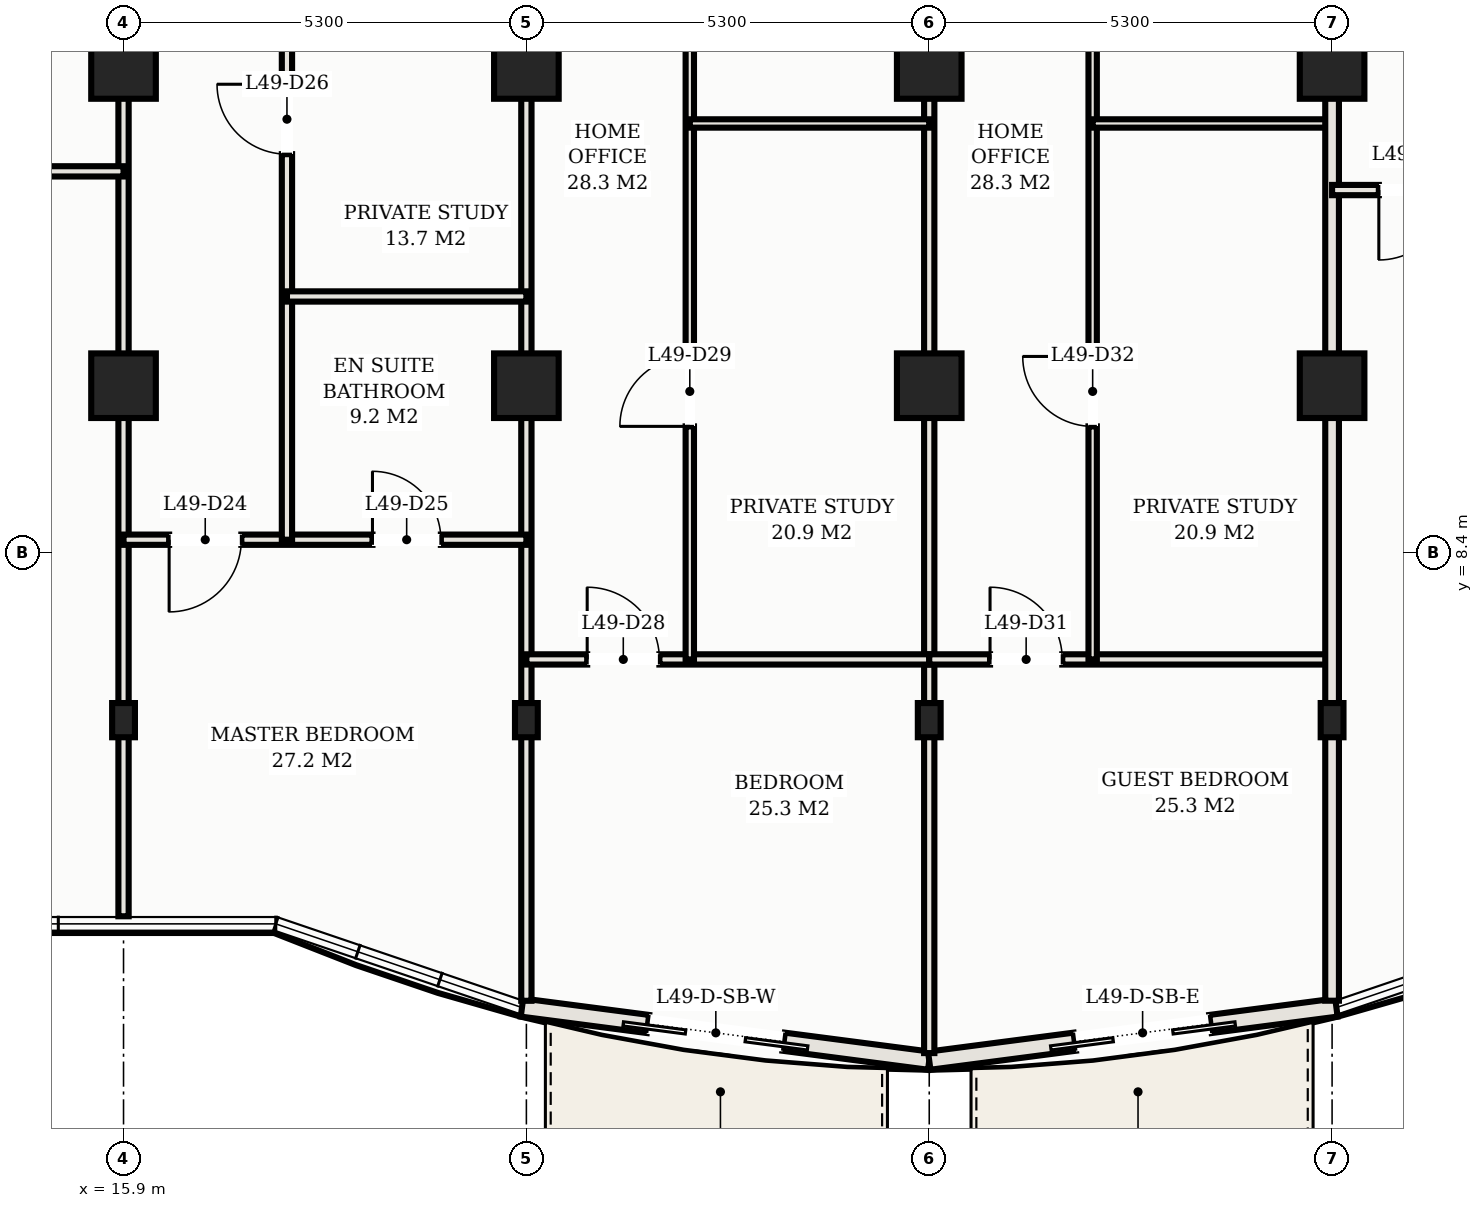
"""IFC4 building model, lengths in metres.
Left out: names, types, materials, properties, quantities, classifications, styles, units other than length and angle.
Written with IfcOpenShell. Run it as: python <this file> out.ifc"""

import sys

from ifc_helpers import new_model, si_unit, direction, frame, frame_2d, origin, origin_2d, place, context, subcontext, project, spatial, rectangle, hollow_rectangle, extrude, element, fill, save


model = new_model("IFC4")
c1 = context("Model", 3, precision=1e-05, world=origin(), true_north=direction((0.0, 1.0)))
c2 = subcontext(c1, "Body", "Model", "MODEL_VIEW")
j1 = project(units=[si_unit("LENGTHUNIT", "METRE"), si_unit("PLANEANGLEUNIT", "RADIAN")], contexts=[c1])
p1 = place(None, origin())
s1 = spatial("IfcSite", under=j1, at=p1, CompositionType="ELEMENT")
p2 = place(p1, origin())
s2 = spatial("IfcBuilding", under=s1, at=p2, CompositionType="ELEMENT")
p3 = place(p2, frame((0.0, 0.0, 178.8)))
s3 = spatial("IfcBuildingStorey", under=s2, at=p3, CompositionType="ELEMENT", Elevation=178.8)
for number, where, z_axis, x_axis in (
    (1, (15.9, 14.8, 0.0), (0.0, 0.0, 1.0), (1.0, 0.0, 0.0)),
    (2, (15.9, 10.6, 0.0), (0.0, 0.0, 1.0), (1.0, 0.0, 0.0)),
    (3, (21.2, 14.8, 0.0), (0.0, 0.0, 1.0), (1.0, 0.0, 0.0)),
    (4, (21.2, 10.6, 0.0), (0.0, 0.0, 1.0), (1.0, 0.0, 0.0)),
    (5, (26.5, 14.8, 0.0), (0.0, 0.0, 1.0), (1.0, 0.0, 0.0)),
    (6, (26.5, 10.6, 0.0), (0.0, 0.0, 1.0), (1.0, 0.0, 0.0)),
    (7, (31.8, 14.8, 0.0), (0.0, 0.0, 1.0), (1.0, 0.0, 0.0)),
    (8, (31.8, 10.6, 0.0), (0.0, 0.0, 1.0), (1.0, 0.0, 0.0)),
):
    element("IfcColumn", number, at=place(p3, frame(where, z_axis=z_axis, x_axis=x_axis)), inside=s3, PredefinedType="COLUMN", context=c2, shape_type="SweptSolid", body=[
        extrude(hollow_rectangle(XDim=0.85, YDim=0.85, WallThickness=0.028, at=origin_2d()), origin(), (0.0, 0.0, 1.0), 3.3),
    ])
for number, where, z_axis, x_axis in (
    (9, (15.9, 6.2, 0.0), (0.0, 0.0, 1.0), (1.0, 0.0, 0.0)),
    (10, (21.2, 6.2, 0.0), (0.0, 0.0, 1.0), (1.0, 0.0, 0.0)),
    (11, (26.5, 6.2, 0.0), (0.0, 0.0, 1.0), (1.0, 0.0, 0.0)),
    (12, (31.8, 6.2, 0.0), (0.0, 0.0, 1.0), (1.0, 0.0, 0.0)),
):
    element("IfcColumn", number, at=place(p3, frame(where, z_axis=z_axis, x_axis=x_axis)), inside=s3, PredefinedType="COLUMN", context=c2, shape_type="SweptSolid", body=[
        extrude(hollow_rectangle(XDim=0.3, YDim=0.45, WallThickness=0.016, at=origin_2d()), origin(), (0.0, 0.0, 1.0), 3.3),
    ])
p4 = place(p3, frame((21.142, 2.419, 0.0), z_axis=(0.0, 0.0, 1.0), x_axis=(0.991597639478, -0.129360432053, 0.0)))
e13 = element("IfcWall", 13, at=p4, inside=s3, PredefinedType="SOLIDWALL", context=c2, shape_type="SweptSolid", body=[
    extrude(rectangle(XDim=5.403, YDim=0.24, at=frame_2d((2.702, 0.0))), origin(), (0.0, 0.0, 1.0), 3.1),
])
p5 = place(p4, frame((1.672, 0.0, 0.0)))
e14 = element("IfcOpeningElement", 14, at=p5, cuts=e13, PredefinedType="OPENING", context=c2, shape_type="SweptSolid", body=[
    extrude(rectangle(XDim=1.8, YDim=2.2, at=frame_2d((0.9, 1.1))), frame((0.0, 0.13, 0.0), z_axis=(0.0, -1.0, 0.0), x_axis=(1.0, 0.0, 0.0)), (0.0, 0.0, 1.0), 0.26),
])
p6 = place(p3, frame((26.5, 1.72, 0.0), z_axis=(0.0, 0.0, 1.0), x_axis=(0.991594614239, 0.129383619568, 0.0)))
e15 = element("IfcWall", 15, at=p6, inside=s3, PredefinedType="SOLIDWALL", context=c2, shape_type="SweptSolid", body=[
    extrude(rectangle(XDim=5.402, YDim=0.24, at=frame_2d((2.701, 0.0))), origin(), (0.0, 0.0, 1.0), 3.1),
])
p7 = place(p6, frame((1.931, 0.0, 0.0)))
e16 = element("IfcOpeningElement", 16, at=p7, cuts=e15, PredefinedType="OPENING", context=c2, shape_type="SweptSolid", body=[
    extrude(rectangle(XDim=1.8, YDim=2.2, at=frame_2d((0.9, 1.1))), frame((0.0, 0.13, 0.0), z_axis=(0.0, -1.0, 0.0), x_axis=(1.0, 0.0, 0.0)), (0.0, 0.0, 1.0), 0.26),
])
p8 = place(p3, frame((15.9, 3.62, 0.0), z_axis=(0.0, 0.0, 1.0), x_axis=(0.0, 1.0, 0.0)))
e17 = element("IfcWall", 17, at=p8, inside=s3, PredefinedType="PARTITIONING", context=c2, shape_type="SweptSolid", body=[
    extrude(rectangle(XDim=17.48, YDim=0.135, at=frame_2d((8.74, 0.0))), origin(), (0.0, 0.0, 1.0), 2.38),
])
p9 = place(p8, frame((15.695, 0.0, 0.0)))
e18 = element("IfcOpeningElement", 18, at=p9, cuts=e17, PredefinedType="OPENING", context=c2, shape_type="SweptSolid", body=[
    extrude(rectangle(XDim=0.92, YDim=2.15, at=frame_2d((0.46, 1.075))), frame((0.0, 0.078, 0.0), z_axis=(0.0, -1.0, 0.0), x_axis=(1.0, 0.0, 0.0)), (0.0, 0.0, 1.0), 0.155),
])
p10 = place(p3, frame((21.2, 2.508, 0.0), z_axis=(0.0, 0.0, 1.0), x_axis=(0.0, 1.0, 0.0)))
e19 = element("IfcWall", 19, at=p10, inside=s3, PredefinedType="PARTITIONING", context=c2, shape_type="SweptSolid", body=[
    extrude(rectangle(XDim=18.592, YDim=0.135, at=frame_2d((9.296, 0.0))), origin(), (0.0, 0.0, 1.0), 2.38),
])
p11 = place(p10, frame((16.807, 0.0, 0.0)))
e20 = element("IfcOpeningElement", 20, at=p11, cuts=e19, PredefinedType="OPENING", context=c2, shape_type="SweptSolid", body=[
    extrude(rectangle(XDim=0.92, YDim=2.15, at=frame_2d((0.46, 1.075))), frame((0.0, 0.078, 0.0), z_axis=(0.0, -1.0, 0.0), x_axis=(1.0, 0.0, 0.0)), (0.0, 0.0, 1.0), 0.155),
])
p12 = place(p3, frame((26.5, 1.82, 0.0), z_axis=(0.0, 0.0, 1.0), x_axis=(0.0, 1.0, 0.0)))
e21 = element("IfcWall", 21, at=p12, inside=s3, PredefinedType="PARTITIONING", context=c2, shape_type="SweptSolid", body=[
    extrude(rectangle(XDim=19.28, YDim=0.135, at=frame_2d((9.64, 0.0))), origin(), (0.0, 0.0, 1.0), 2.38),
])
p13 = place(p12, frame((17.495, 0.0, 0.0)))
e22 = element("IfcOpeningElement", 22, at=p13, cuts=e21, PredefinedType="OPENING", context=c2, shape_type="SweptSolid", body=[
    extrude(rectangle(XDim=0.92, YDim=2.15, at=frame_2d((0.46, 1.075))), frame((0.0, 0.078, 0.0), z_axis=(0.0, -1.0, 0.0), x_axis=(1.0, 0.0, 0.0)), (0.0, 0.0, 1.0), 0.155),
])
p14 = place(p3, frame((10.6, 13.42, 0.0), z_axis=(0.0, 0.0, 1.0), x_axis=(1.0, 0.0, 0.0)))
e23 = element("IfcWall", 23, at=p14, inside=s3, PredefinedType="PARTITIONING", context=c2, shape_type="SweptSolid", body=[
    extrude(rectangle(XDim=5.3, YDim=0.135, at=frame_2d((2.65, 0.0))), origin(), (0.0, 0.0, 1.0), 2.38),
])
p15 = place(p14, frame((0.815, 0.0, 0.0)))
e24 = element("IfcOpeningElement", 24, at=p15, cuts=e23, PredefinedType="OPENING", context=c2, shape_type="SweptSolid", body=[
    extrude(rectangle(XDim=0.92, YDim=2.15, at=frame_2d((0.46, 1.075))), frame((0.0, 0.078, 0.0), z_axis=(0.0, -1.0, 0.0), x_axis=(1.0, 0.0, 0.0)), (0.0, 0.0, 1.0), 0.155),
])
p16 = place(p3, frame((15.9, 8.574, 0.0), z_axis=(0.0, 0.0, 1.0), x_axis=(1.0, 0.0, 0.0)))
e25 = element("IfcWall", 25, at=p16, inside=s3, PredefinedType="PARTITIONING", context=c2, shape_type="SweptSolid", body=[
    extrude(rectangle(XDim=5.3, YDim=0.135, at=frame_2d((2.65, 0.0))), origin(), (0.0, 0.0, 1.0), 2.38),
])
p17 = place(p16, frame((0.6, 0.0, 0.0)))
e26 = element("IfcOpeningElement", 26, at=p17, cuts=e25, PredefinedType="OPENING", context=c2, shape_type="SweptSolid", body=[
    extrude(rectangle(XDim=0.95, YDim=2.15, at=frame_2d((0.475, 1.075))), frame((0.0, 0.078, 0.0), z_axis=(0.0, -1.0, 0.0), x_axis=(1.0, 0.0, 0.0)), (0.0, 0.0, 1.0), 0.155),
])
p18 = place(p16, frame((3.275, 0.0, 0.0)))
e27 = element("IfcOpeningElement", 27, at=p18, cuts=e25, PredefinedType="OPENING", context=c2, shape_type="SweptSolid", body=[
    extrude(rectangle(XDim=0.9, YDim=2.15, at=frame_2d((0.45, 1.075))), frame((0.0, 0.078, 0.0), z_axis=(0.0, -1.0, 0.0), x_axis=(1.0, 0.0, 0.0)), (0.0, 0.0, 1.0), 0.155),
])
p19 = place(p3, frame((18.05, 8.574, 0.0), z_axis=(0.0, 0.0, 1.0), x_axis=(0.0, 1.0, 0.0)))
e28 = element("IfcWall", 28, at=p19, inside=s3, PredefinedType="PARTITIONING", context=c2, shape_type="SweptSolid", body=[
    extrude(rectangle(XDim=12.526, YDim=0.135, at=frame_2d((6.263, 0.0))), origin(), (0.0, 0.0, 1.0), 2.38),
])
p20 = place(p19, frame((5.072, 0.0, 0.0)))
e29 = element("IfcOpeningElement", 29, at=p20, cuts=e28, PredefinedType="OPENING", context=c2, shape_type="SweptSolid", body=[
    extrude(rectangle(XDim=0.92, YDim=2.15, at=frame_2d((0.46, 1.075))), frame((0.0, 0.078, 0.0), z_axis=(0.0, -1.0, 0.0), x_axis=(1.0, 0.0, 0.0)), (0.0, 0.0, 1.0), 0.155),
])
p21 = place(p3, frame((18.05, 11.774, 0.0), z_axis=(0.0, 0.0, 1.0), x_axis=(1.0, 0.0, 0.0)))
e30 = element("IfcWall", 30, at=p21, inside=s3, PredefinedType="PARTITIONING", context=c2, shape_type="SweptSolid", body=[
    extrude(rectangle(XDim=3.15, YDim=0.135, at=frame_2d((1.575, 0.0))), origin(), (0.0, 0.0, 1.0), 2.38),
])
p22 = place(p3, frame((21.2, 6.999, 0.0), z_axis=(0.0, 0.0, 1.0), x_axis=(1.0, 0.0, 0.0)))
e31 = element("IfcWall", 31, at=p22, inside=s3, PredefinedType="PARTITIONING", context=c2, shape_type="SweptSolid", body=[
    extrude(rectangle(XDim=5.3, YDim=0.135, at=frame_2d((2.65, 0.0))), origin(), (0.0, 0.0, 1.0), 2.38),
])
p23 = place(p22, frame((0.8, 0.0, 0.0)))
e32 = element("IfcOpeningElement", 32, at=p23, cuts=e31, PredefinedType="OPENING", context=c2, shape_type="SweptSolid", body=[
    extrude(rectangle(XDim=0.95, YDim=2.15, at=frame_2d((0.475, 1.075))), frame((0.0, 0.078, 0.0), z_axis=(0.0, -1.0, 0.0), x_axis=(1.0, 0.0, 0.0)), (0.0, 0.0, 1.0), 0.155),
])
p24 = place(p3, frame((23.35, 6.999, 0.0), z_axis=(0.0, 0.0, 1.0), x_axis=(0.0, 1.0, 0.0)))
e33 = element("IfcWall", 33, at=p24, inside=s3, PredefinedType="MOVABLE", context=c2, shape_type="SweptSolid", body=[
    extrude(rectangle(XDim=14.101, YDim=0.11, at=frame_2d((7.051, 0.0))), origin(), (0.0, 0.0, 1.0), 2.38),
])
p25 = place(p24, frame((3.066, 0.0, 0.0)))
e34 = element("IfcOpeningElement", 34, at=p25, cuts=e33, PredefinedType="OPENING", context=c2, shape_type="SweptSolid", body=[
    extrude(rectangle(XDim=0.92, YDim=2.15, at=frame_2d((0.46, 1.075))), frame((0.0, 0.065, 0.0), z_axis=(0.0, -1.0, 0.0), x_axis=(1.0, 0.0, 0.0)), (0.0, 0.0, 1.0), 0.13),
])
p26 = place(p24, frame((10.116, 0.0, 0.0)))
e35 = element("IfcOpeningElement", 35, at=p26, cuts=e33, PredefinedType="OPENING", context=c2, shape_type="SweptSolid", body=[
    extrude(rectangle(XDim=0.92, YDim=2.15, at=frame_2d((0.46, 1.075))), frame((0.0, 0.065, 0.0), z_axis=(0.0, -1.0, 0.0), x_axis=(1.0, 0.0, 0.0)), (0.0, 0.0, 1.0), 0.13),
])
p27 = place(p3, frame((23.35, 14.05, 0.0), z_axis=(0.0, 0.0, 1.0), x_axis=(1.0, 0.0, 0.0)))
e36 = element("IfcWall", 36, at=p27, inside=s3, PredefinedType="MOVABLE", context=c2, shape_type="SweptSolid", body=[
    extrude(rectangle(XDim=3.15, YDim=0.11, at=frame_2d((1.575, 0.0))), origin(), (0.0, 0.0, 1.0), 2.38),
])
p28 = place(p3, frame((26.5, 6.999, 0.0), z_axis=(0.0, 0.0, 1.0), x_axis=(1.0, 0.0, 0.0)))
e37 = element("IfcWall", 37, at=p28, inside=s3, PredefinedType="PARTITIONING", context=c2, shape_type="SweptSolid", body=[
    extrude(rectangle(XDim=5.3, YDim=0.135, at=frame_2d((2.65, 0.0))), origin(), (0.0, 0.0, 1.0), 2.38),
])
p29 = place(p28, frame((0.8, 0.0, 0.0)))
e38 = element("IfcOpeningElement", 38, at=p29, cuts=e37, PredefinedType="OPENING", context=c2, shape_type="SweptSolid", body=[
    extrude(rectangle(XDim=0.95, YDim=2.15, at=frame_2d((0.475, 1.075))), frame((0.0, 0.078, 0.0), z_axis=(0.0, -1.0, 0.0), x_axis=(1.0, 0.0, 0.0)), (0.0, 0.0, 1.0), 0.155),
])
p30 = place(p3, frame((28.65, 6.999, 0.0), z_axis=(0.0, 0.0, 1.0), x_axis=(0.0, 1.0, 0.0)))
e39 = element("IfcWall", 39, at=p30, inside=s3, PredefinedType="MOVABLE", context=c2, shape_type="SweptSolid", body=[
    extrude(rectangle(XDim=14.101, YDim=0.11, at=frame_2d((7.051, 0.0))), origin(), (0.0, 0.0, 1.0), 2.38),
])
p31 = place(p30, frame((3.066, 0.0, 0.0)))
e40 = element("IfcOpeningElement", 40, at=p31, cuts=e39, PredefinedType="OPENING", context=c2, shape_type="SweptSolid", body=[
    extrude(rectangle(XDim=0.92, YDim=2.15, at=frame_2d((0.46, 1.075))), frame((0.0, 0.065, 0.0), z_axis=(0.0, -1.0, 0.0), x_axis=(1.0, 0.0, 0.0)), (0.0, 0.0, 1.0), 0.13),
])
p32 = place(p30, frame((10.116, 0.0, 0.0)))
e41 = element("IfcOpeningElement", 41, at=p32, cuts=e39, PredefinedType="OPENING", context=c2, shape_type="SweptSolid", body=[
    extrude(rectangle(XDim=0.92, YDim=2.15, at=frame_2d((0.46, 1.075))), frame((0.0, 0.065, 0.0), z_axis=(0.0, -1.0, 0.0), x_axis=(1.0, 0.0, 0.0)), (0.0, 0.0, 1.0), 0.13),
])
p33 = place(p3, frame((28.65, 14.05, 0.0), z_axis=(0.0, 0.0, 1.0), x_axis=(1.0, 0.0, 0.0)))
e42 = element("IfcWall", 42, at=p33, inside=s3, PredefinedType="MOVABLE", context=c2, shape_type="SweptSolid", body=[
    extrude(rectangle(XDim=3.15, YDim=0.11, at=frame_2d((1.575, 0.0))), origin(), (0.0, 0.0, 1.0), 2.38),
])
p34 = place(p3, frame((31.8, 2.509, 0.0), z_axis=(0.0, 0.0, 1.0), x_axis=(0.0, 1.0, 0.0)))
e43 = element("IfcWall", 43, at=p34, inside=s3, PredefinedType="PARTITIONING", context=c2, shape_type="SweptSolid", body=[
    extrude(rectangle(XDim=18.591, YDim=0.18, at=frame_2d((9.295, 0.0))), origin(), (0.0, 0.0, 1.0), 2.38),
])
p35 = place(p3, frame((31.8, 13.174, 0.0), z_axis=(0.0, 0.0, 1.0), x_axis=(1.0, 0.0, 0.0)))
e44 = element("IfcWall", 44, at=p35, inside=s3, PredefinedType="PARTITIONING", context=c2, shape_type="SweptSolid", body=[
    extrude(rectangle(XDim=5.3, YDim=0.135, at=frame_2d((2.65, 0.0))), origin(), (0.0, 0.0, 1.0), 2.38),
])
p36 = place(p35, frame((0.615, 0.0, 0.0)))
e45 = element("IfcOpeningElement", 45, at=p36, cuts=e44, PredefinedType="OPENING", context=c2, shape_type="SweptSolid", body=[
    extrude(rectangle(XDim=0.92, YDim=2.15, at=frame_2d((0.46, 1.075))), frame((0.0, 0.078, 0.0), z_axis=(0.0, -1.0, 0.0), x_axis=(1.0, 0.0, 0.0)), (0.0, 0.0, 1.0), 0.155),
])
p37 = place(p5, frame((1.8, 0.0, 0.0), z_axis=(0.0, 0.0, 1.0), x_axis=(-1.0, 0.0, 0.0)))
e46 = element("IfcDoor", 46, at=p37, inside=s3, OperationType="DOUBLE_DOOR_SLIDING", PredefinedType="DOOR", context=c2, shape_type="SweptSolid", body=[
    extrude(rectangle(XDim=1.8, YDim=2.2, at=frame_2d((0.9, 1.1))), frame((0.0, 0.025, 0.0), z_axis=(0.0, -1.0, 0.0), x_axis=(1.0, 0.0, 0.0)), (0.0, 0.0, 1.0), 0.05),
])
fill(e14, e46)
p38 = place(p7, frame((1.8, 0.0, 0.0), z_axis=(0.0, 0.0, 1.0), x_axis=(-1.0, 0.0, 0.0)))
e47 = element("IfcDoor", 47, at=p38, inside=s3, OperationType="DOUBLE_DOOR_SLIDING", PredefinedType="DOOR", context=c2, shape_type="SweptSolid", body=[
    extrude(rectangle(XDim=1.8, YDim=2.2, at=frame_2d((0.9, 1.1))), frame((0.0, 0.025, 0.0), z_axis=(0.0, -1.0, 0.0), x_axis=(1.0, 0.0, 0.0)), (0.0, 0.0, 1.0), 0.05),
])
fill(e16, e47)
p39 = place(p17, frame((0.95, 0.0, 0.0), z_axis=(0.0, 0.0, 1.0), x_axis=(-1.0, 0.0, 0.0)))
e48 = element("IfcDoor", 48, at=p39, inside=s3, OperationType="SINGLE_SWING_RIGHT", PredefinedType="DOOR", context=c2, shape_type="SweptSolid", body=[
    extrude(rectangle(XDim=0.95, YDim=2.15, at=frame_2d((0.475, 1.075))), frame((0.0, 0.025, 0.0), z_axis=(0.0, -1.0, 0.0), x_axis=(1.0, 0.0, 0.0)), (0.0, 0.0, 1.0), 0.05),
])
fill(e26, e48)
p40 = place(p18, origin())
e49 = element("IfcDoor", 49, at=p40, inside=s3, OperationType="SINGLE_SWING_LEFT", PredefinedType="DOOR", context=c2, shape_type="SweptSolid", body=[
    extrude(rectangle(XDim=0.9, YDim=2.15, at=frame_2d((0.45, 1.075))), frame((0.0, 0.025, 0.0), z_axis=(0.0, -1.0, 0.0), x_axis=(1.0, 0.0, 0.0)), (0.0, 0.0, 1.0), 0.05),
])
fill(e27, e49)
p41 = place(p20, origin())
e50 = element("IfcDoor", 50, at=p41, inside=s3, OperationType="SINGLE_SWING_RIGHT", PredefinedType="DOOR", context=c2, shape_type="SweptSolid", body=[
    extrude(rectangle(XDim=0.92, YDim=2.15, at=frame_2d((0.46, 1.075))), frame((0.0, 0.025, 0.0), z_axis=(0.0, -1.0, 0.0), x_axis=(1.0, 0.0, 0.0)), (0.0, 0.0, 1.0), 0.05),
])
fill(e29, e50)
p42 = place(p23, origin())
e51 = element("IfcDoor", 51, at=p42, inside=s3, OperationType="SINGLE_SWING_LEFT", PredefinedType="DOOR", context=c2, shape_type="SweptSolid", body=[
    extrude(rectangle(XDim=0.95, YDim=2.15, at=frame_2d((0.475, 1.075))), frame((0.0, 0.025, 0.0), z_axis=(0.0, -1.0, 0.0), x_axis=(1.0, 0.0, 0.0)), (0.0, 0.0, 1.0), 0.05),
])
fill(e32, e51)
p43 = place(p25, origin())
e52 = element("IfcDoor", 52, at=p43, inside=s3, OperationType="SINGLE_SWING_LEFT", PredefinedType="DOOR", context=c2, shape_type="SweptSolid", body=[
    extrude(rectangle(XDim=0.92, YDim=2.15, at=frame_2d((0.46, 1.075))), frame((0.0, 0.025, 0.0), z_axis=(0.0, -1.0, 0.0), x_axis=(1.0, 0.0, 0.0)), (0.0, 0.0, 1.0), 0.05),
])
fill(e34, e52)
p44 = place(p29, origin())
e53 = element("IfcDoor", 53, at=p44, inside=s3, OperationType="SINGLE_SWING_LEFT", PredefinedType="DOOR", context=c2, shape_type="SweptSolid", body=[
    extrude(rectangle(XDim=0.95, YDim=2.15, at=frame_2d((0.475, 1.075))), frame((0.0, 0.025, 0.0), z_axis=(0.0, -1.0, 0.0), x_axis=(1.0, 0.0, 0.0)), (0.0, 0.0, 1.0), 0.05),
])
fill(e38, e53)
p45 = place(p31, origin())
e54 = element("IfcDoor", 54, at=p45, inside=s3, OperationType="SINGLE_SWING_RIGHT", PredefinedType="DOOR", context=c2, shape_type="SweptSolid", body=[
    extrude(rectangle(XDim=0.92, YDim=2.15, at=frame_2d((0.46, 1.075))), frame((0.0, 0.025, 0.0), z_axis=(0.0, -1.0, 0.0), x_axis=(1.0, 0.0, 0.0)), (0.0, 0.0, 1.0), 0.05),
])
fill(e40, e54)
p46 = place(p36, frame((0.92, 0.0, 0.0), z_axis=(0.0, 0.0, 1.0), x_axis=(-1.0, 0.0, 0.0)))
e55 = element("IfcDoor", 55, at=p46, inside=s3, OperationType="SINGLE_SWING_RIGHT", PredefinedType="DOOR", context=c2, shape_type="SweptSolid", body=[
    extrude(rectangle(XDim=0.92, YDim=2.15, at=frame_2d((0.46, 1.075))), frame((0.0, 0.025, 0.0), z_axis=(0.0, -1.0, 0.0), x_axis=(1.0, 0.0, 0.0)), (0.0, 0.0, 1.0), 0.05),
])
fill(e45, e55)
save(model, sys.argv[1])
